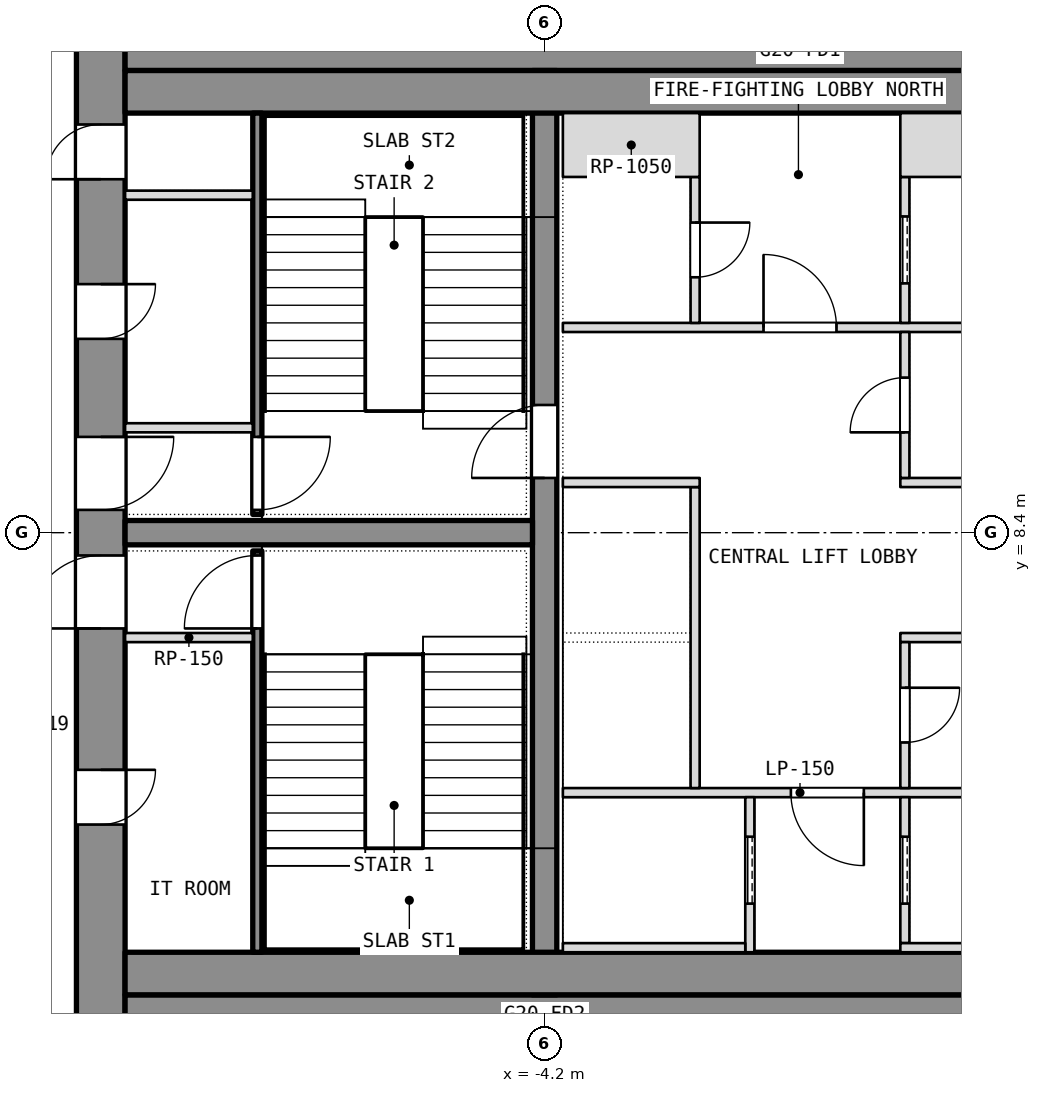
"""IFC4 building model, lengths in metres.
Left out: names, types, materials, properties, quantities, classifications, styles, units other than length and angle.
Written with IfcOpenShell. Run it as: python <this file> out.ifc"""

import sys

from ifc_helpers import new_model, si_unit, direction, frame, frame_2d, origin, place, context, subcontext, project, spatial, rectangle, extrude, element, fill, save


model = new_model("IFC4")
c1 = context("Model", 3, precision=1e-05, world=origin(), true_north=direction((0.0, 1.0)))
c2 = subcontext(c1, "Body", "Model", "MODEL_VIEW")
j1 = project(units=[si_unit("LENGTHUNIT", "METRE"), si_unit("PLANEANGLEUNIT", "RADIAN")], contexts=[c1])
p1 = place(None, origin())
s1 = spatial("IfcSite", under=j1, at=p1, CompositionType="ELEMENT")
p2 = place(p1, origin())
s2 = spatial("IfcBuilding", under=s1, at=p2, CompositionType="ELEMENT")
p3 = place(p2, frame((0.0, 0.0, 234.5)))
s3 = spatial("IfcBuildingStorey", under=s2, at=p3, CompositionType="ELEMENT", Elevation=234.5)
p4 = place(p3, frame((-11.5, 0.0, 0.0), z_axis=(0.0, 0.0, 1.0), x_axis=(0.0, 1.0, 0.0)))
e1 = element("IfcWall", 1, at=p4, inside=s3, PredefinedType="SHEAR", context=c2, shape_type="SweptSolid", body=[
    extrude(rectangle(XDim=16.8, YDim=0.8, at=frame_2d((8.4, 0.0))), origin(), (0.0, 0.0, 1.0), 3.6),
])
p5 = place(p4, frame((3.6, 0.0, 0.0)))
e2 = element("IfcOpeningElement", 2, at=p5, cuts=e1, PredefinedType="OPENING", context=c2, shape_type="SweptSolid", body=[
    extrude(rectangle(XDim=0.9, YDim=2.1, at=frame_2d((0.45, 1.05))), frame((0.0, 0.4, 0.0), z_axis=(0.0, -1.0, 0.0), x_axis=(1.0, 0.0, 0.0)), (0.0, 0.0, 1.0), 0.8),
])
p6 = place(p4, frame((6.825, 0.0, 0.0)))
e3 = element("IfcOpeningElement", 3, at=p6, cuts=e1, PredefinedType="OPENING", context=c2, shape_type="SweptSolid", body=[
    extrude(rectangle(XDim=1.2, YDim=2.1, at=frame_2d((0.6, 1.05))), frame((0.0, 0.4, 0.0), z_axis=(0.0, -1.0, 0.0), x_axis=(1.0, 0.0, 0.0)), (0.0, 0.0, 1.0), 0.8),
])
p7 = place(p4, frame((14.212, 0.0, 0.0)))
e4 = element("IfcOpeningElement", 4, at=p7, cuts=e1, PredefinedType="OPENING", context=c2, shape_type="SweptSolid", body=[
    extrude(rectangle(XDim=0.9, YDim=2.1, at=frame_2d((0.45, 1.05))), frame((0.0, 0.4, 0.0), z_axis=(0.0, -1.0, 0.0), x_axis=(1.0, 0.0, 0.0)), (0.0, 0.0, 1.0), 0.8),
])
p8 = place(p4, frame((11.587, 0.0, 0.0)))
e5 = element("IfcOpeningElement", 5, at=p8, cuts=e1, PredefinedType="OPENING", context=c2, shape_type="SweptSolid", body=[
    extrude(rectangle(XDim=0.9, YDim=2.1, at=frame_2d((0.45, 1.05))), frame((0.0, 0.4, 0.0), z_axis=(0.0, -1.0, 0.0), x_axis=(1.0, 0.0, 0.0)), (0.0, 0.0, 1.0), 0.8),
])
p9 = place(p4, frame((8.775, 0.0, 0.0)))
e6 = element("IfcOpeningElement", 6, at=p9, cuts=e1, PredefinedType="OPENING", context=c2, shape_type="SweptSolid", body=[
    extrude(rectangle(XDim=1.2, YDim=2.1, at=frame_2d((0.6, 1.05))), frame((0.0, 0.4, 0.0), z_axis=(0.0, -1.0, 0.0), x_axis=(1.0, 0.0, 0.0)), (0.0, 0.0, 1.0), 0.8),
])
for number, where, z_axis, x_axis in (
    (7, (-11.1, 0.4, 0.0), (0.0, 0.0, 1.0), (1.0, 0.0, 0.0)),
    (8, (-11.1, 16.4, 0.0), (0.0, 0.0, 1.0), (1.0, 0.0, 0.0)),
):
    element("IfcWall", number, at=place(p3, frame(where, z_axis=z_axis, x_axis=x_axis)), inside=s3, PredefinedType="SHEAR", context=c2, shape_type="SweptSolid", body=[
        extrude(rectangle(XDim=22.2, YDim=0.8, at=frame_2d((11.1, 0.0))), origin(), (0.0, 0.0, 1.0), 3.6),
    ])
p10 = place(p3, frame((-4.2, 0.8, 0.0), z_axis=(0.0, 0.0, 1.0), x_axis=(0.0, 1.0, 0.0)))
e9 = element("IfcWall", 9, at=p10, inside=s3, PredefinedType="SHEAR", context=c2, shape_type="SweptSolid", body=[
    extrude(rectangle(XDim=15.2, YDim=0.4, at=frame_2d((7.6, 0.0))), origin(), (0.0, 0.0, 1.0), 3.6),
])
p11 = place(p10, frame((8.5, 0.0, 0.0)))
e10 = element("IfcOpeningElement", 10, at=p11, cuts=e9, PredefinedType="OPENING", context=c2, shape_type="SweptSolid", body=[
    extrude(rectangle(XDim=1.2, YDim=2.1, at=frame_2d((0.6, 1.05))), frame((0.0, 0.2, 0.0), z_axis=(0.0, -1.0, 0.0), x_axis=(1.0, 0.0, 0.0)), (0.0, 0.0, 1.0), 0.4),
])
p12 = place(p3, frame((-11.1, 8.4, 0.0), z_axis=(0.0, 0.0, 1.0), x_axis=(1.0, 0.0, 0.0)))
e11 = element("IfcWall", 11, at=p12, inside=s3, PredefinedType="SHEAR", context=c2, shape_type="SweptSolid", body=[
    extrude(rectangle(XDim=6.7, YDim=0.4, at=frame_2d((3.35, 0.0))), origin(), (0.0, 0.0, 1.0), 3.6),
])
for number, where, z_axis, x_axis in (
    (12, (-11.1, 1.15, 0.0), (0.0, 0.0, 1.0), (1.0, 0.0, 0.0)),
    (13, (-11.1, 15.65, 0.0), (0.0, 0.0, 1.0), (1.0, 0.0, 0.0)),
):
    element("IfcWall", number, at=place(p3, frame(where, z_axis=z_axis, x_axis=x_axis)), inside=s3, PredefinedType="PARTITIONING", context=c2, shape_type="SweptSolid", body=[
        extrude(rectangle(XDim=22.2, YDim=0.7, at=frame_2d((11.1, 0.0))), origin(), (0.0, 0.0, 1.0), 3.34),
    ])
p13 = place(p3, frame((-8.925, 1.5, 0.0), z_axis=(0.0, 0.0, 1.0), x_axis=(0.0, 1.0, 0.0)))
e14 = element("IfcWall", 14, at=p13, inside=s3, PredefinedType="SHEAR", context=c2, shape_type="SweptSolid", body=[
    extrude(rectangle(XDim=6.6, YDim=0.15, at=frame_2d((3.3, 0.0))), origin(), (0.0, 0.0, 1.0), 3.34),
])
p14 = place(p13, frame((5.325, 0.0, 0.0)))
e15 = element("IfcOpeningElement", 15, at=p14, cuts=e14, PredefinedType="OPENING", context=c2, shape_type="SweptSolid", body=[
    extrude(rectangle(XDim=1.2, YDim=2.1, at=frame_2d((0.6, 1.05))), frame((0.0, 0.075, 0.0), z_axis=(0.0, -1.0, 0.0), x_axis=(1.0, 0.0, 0.0)), (0.0, 0.0, 1.0), 0.15),
])
p15 = place(p3, frame((-11.1, 6.675, 0.0), z_axis=(0.0, 0.0, 1.0), x_axis=(1.0, 0.0, 0.0)))
e16 = element("IfcWall", 16, at=p15, inside=s3, PredefinedType="PARTITIONING", context=c2, shape_type="SweptSolid", body=[
    extrude(rectangle(XDim=2.1, YDim=0.15, at=frame_2d((1.05, 0.0))), origin(), (0.0, 0.0, 1.0), 3.34),
])
p16 = place(p3, frame((-8.925, 8.7, 0.0), z_axis=(0.0, 0.0, 1.0), x_axis=(0.0, 1.0, 0.0)))
e17 = element("IfcWall", 17, at=p16, inside=s3, PredefinedType="SHEAR", context=c2, shape_type="SweptSolid", body=[
    extrude(rectangle(XDim=6.6, YDim=0.15, at=frame_2d((3.3, 0.0))), origin(), (0.0, 0.0, 1.0), 3.34),
])
p17 = place(p16, frame((0.075, 0.0, 0.0)))
e18 = element("IfcOpeningElement", 18, at=p17, cuts=e17, PredefinedType="OPENING", context=c2, shape_type="SweptSolid", body=[
    extrude(rectangle(XDim=1.2, YDim=2.1, at=frame_2d((0.6, 1.05))), frame((0.0, 0.075, 0.0), z_axis=(0.0, -1.0, 0.0), x_axis=(1.0, 0.0, 0.0)), (0.0, 0.0, 1.0), 0.15),
])
for number, where, z_axis, x_axis in (
    (19, (-11.1, 10.125, 0.0), (0.0, 0.0, 1.0), (1.0, 0.0, 0.0)),
    (20, (-11.1, 13.95, 0.0), (0.0, 0.0, 1.0), (1.0, 0.0, 0.0)),
):
    element("IfcWall", number, at=place(p3, frame(where, z_axis=z_axis, x_axis=x_axis)), inside=s3, PredefinedType="PARTITIONING", context=c2, shape_type="SweptSolid", body=[
        extrude(rectangle(XDim=2.1, YDim=0.15, at=frame_2d((1.05, 0.0))), origin(), (0.0, 0.0, 1.0), 3.34),
    ])
p18 = place(p3, frame((-3.9, 4.125, 0.0), z_axis=(0.0, 0.0, 1.0), x_axis=(1.0, 0.0, 0.0)))
e21 = element("IfcWall", 21, at=p18, inside=s3, PredefinedType="PARTITIONING", context=c2, shape_type="SweptSolid", body=[
    extrude(rectangle(XDim=7.8, YDim=0.15, at=frame_2d((3.9, 0.0))), origin(), (0.0, 0.0, 1.0), 3.34),
])
p19 = place(p18, frame((3.75, 0.0, 0.0)))
e22 = element("IfcOpeningElement", 22, at=p19, cuts=e21, PredefinedType="OPENING", context=c2, shape_type="SweptSolid", body=[
    extrude(rectangle(XDim=1.2, YDim=2.1, at=frame_2d((0.6, 1.05))), frame((0.0, 0.075, 0.0), z_axis=(0.0, -1.0, 0.0), x_axis=(1.0, 0.0, 0.0)), (0.0, 0.0, 1.0), 0.15),
])
p20 = place(p3, frame((-3.9, 11.775, 0.0), z_axis=(0.0, 0.0, 1.0), x_axis=(1.0, 0.0, 0.0)))
e23 = element("IfcWall", 23, at=p20, inside=s3, PredefinedType="PARTITIONING", context=c2, shape_type="SweptSolid", body=[
    extrude(rectangle(XDim=7.8, YDim=0.15, at=frame_2d((3.9, 0.0))), origin(), (0.0, 0.0, 1.0), 3.34),
])
p21 = place(p20, frame((3.3, 0.0, 0.0)))
e24 = element("IfcOpeningElement", 24, at=p21, cuts=e23, PredefinedType="OPENING", context=c2, shape_type="SweptSolid", body=[
    extrude(rectangle(XDim=1.2, YDim=2.1, at=frame_2d((0.6, 1.05))), frame((0.0, 0.075, 0.0), z_axis=(0.0, -1.0, 0.0), x_axis=(1.0, 0.0, 0.0)), (0.0, 0.0, 1.0), 0.15),
])
p22 = place(p3, frame((-0.825, 1.5, 0.0), z_axis=(0.0, 0.0, 1.0), x_axis=(0.0, 1.0, 0.0)))
e25 = element("IfcWall", 25, at=p22, inside=s3, PredefinedType="SHEAR", context=c2, shape_type="SweptSolid", body=[
    extrude(rectangle(XDim=2.55, YDim=0.15, at=frame_2d((1.275, 0.0))), origin(), (0.0, 0.0, 1.0), 3.6),
])
p23 = place(p22, frame((0.8, 0.0, 0.0)))
e26 = element("IfcOpeningElement", 26, at=p23, cuts=e25, PredefinedType="OPENING", context=c2, shape_type="SweptSolid", body=[
    extrude(rectangle(XDim=1.1, YDim=2.1, at=frame_2d((0.55, 1.05))), frame((0.0, 0.075, 0.0), z_axis=(0.0, -1.0, 0.0), x_axis=(1.0, 0.0, 0.0)), (0.0, 0.0, 1.0), 0.15),
])
p24 = place(p3, frame((-3.9, 1.575, 0.0), z_axis=(0.0, 0.0, 1.0), x_axis=(1.0, 0.0, 0.0)))
e27 = element("IfcWall", 27, at=p24, inside=s3, PredefinedType="SHEAR", context=c2, shape_type="SweptSolid", body=[
    extrude(rectangle(XDim=3.0, YDim=0.15, at=frame_2d((1.5, 0.0))), origin(), (0.0, 0.0, 1.0), 3.6),
])
p25 = place(p3, frame((-1.725, 4.2, 0.0), z_axis=(0.0, 0.0, 1.0), x_axis=(0.0, 1.0, 0.0)))
e28 = element("IfcWall", 28, at=p25, inside=s3, PredefinedType="SHEAR", context=c2, shape_type="SweptSolid", body=[
    extrude(rectangle(XDim=4.95, YDim=0.15, at=frame_2d((2.475, 0.0))), origin(), (0.0, 0.0, 1.0), 3.6),
])
p26 = place(p3, frame((-3.9, 9.225, 0.0), z_axis=(0.0, 0.0, 1.0), x_axis=(1.0, 0.0, 0.0)))
e29 = element("IfcWall", 29, at=p26, inside=s3, PredefinedType="SHEAR", context=c2, shape_type="SweptSolid", body=[
    extrude(rectangle(XDim=2.25, YDim=0.15, at=frame_2d((1.125, 0.0))), origin(), (0.0, 0.0, 1.0), 3.6),
])
p27 = place(p3, frame((-1.725, 11.85, 0.0), z_axis=(0.0, 0.0, 1.0), x_axis=(0.0, 1.0, 0.0)))
e30 = element("IfcWall", 30, at=p27, inside=s3, PredefinedType="PARTITIONING", context=c2, shape_type="SweptSolid", body=[
    extrude(rectangle(XDim=2.4, YDim=0.15, at=frame_2d((1.2, 0.0))), origin(), (0.0, 0.0, 1.0), 3.34),
])
p28 = place(p27, frame((0.75, 0.0, 0.0)))
e31 = element("IfcOpeningElement", 31, at=p28, cuts=e30, PredefinedType="OPENING", context=c2, shape_type="SweptSolid", body=[
    extrude(rectangle(XDim=0.9, YDim=2.1, at=frame_2d((0.45, 1.05))), frame((0.0, 0.075, 0.0), z_axis=(0.0, -1.0, 0.0), x_axis=(1.0, 0.0, 0.0)), (0.0, 0.0, 1.0), 0.15),
])
p29 = place(p3, frame((-3.9, 14.775, 0.0), z_axis=(0.0, 0.0, 1.0), x_axis=(1.0, 0.0, 0.0)))
e32 = element("IfcWall", 32, at=p29, inside=s3, PredefinedType="PARTITIONING", context=c2, shape_type="SweptSolid", body=[
    extrude(rectangle(XDim=2.25, YDim=1.05, at=frame_2d((1.125, 0.0))), origin(), (0.0, 0.0, 1.0), 3.34),
])
p30 = place(p3, frame((1.725, 1.65, 0.0), z_axis=(0.0, 0.0, 1.0), x_axis=(0.0, 1.0, 0.0)))
e33 = element("IfcWall", 33, at=p30, inside=s3, PredefinedType="SHEAR", context=c2, shape_type="SweptSolid", body=[
    extrude(rectangle(XDim=2.4, YDim=0.15, at=frame_2d((1.2, 0.0))), origin(), (0.0, 0.0, 1.0), 3.6),
])
p31 = place(p30, frame((0.65, 0.0, 0.0)))
e34 = element("IfcOpeningElement", 34, at=p31, cuts=e33, PredefinedType="OPENING", context=c2, shape_type="SweptSolid", body=[
    extrude(rectangle(XDim=1.1, YDim=2.1, at=frame_2d((0.55, 1.05))), frame((0.0, 0.075, 0.0), z_axis=(0.0, -1.0, 0.0), x_axis=(1.0, 0.0, 0.0)), (0.0, 0.0, 1.0), 0.15),
])
p32 = place(p3, frame((1.65, 1.575, 0.0), z_axis=(0.0, 0.0, 1.0), x_axis=(1.0, 0.0, 0.0)))
e35 = element("IfcWall", 35, at=p32, inside=s3, PredefinedType="SHEAR", context=c2, shape_type="SweptSolid", body=[
    extrude(rectangle(XDim=2.25, YDim=0.15, at=frame_2d((1.125, 0.0))), origin(), (0.0, 0.0, 1.0), 3.6),
])
p33 = place(p3, frame((1.725, 11.85, 0.0), z_axis=(0.0, 0.0, 1.0), x_axis=(0.0, 1.0, 0.0)))
e36 = element("IfcWall", 36, at=p33, inside=s3, PredefinedType="SHEAR", context=c2, shape_type="SweptSolid", body=[
    extrude(rectangle(XDim=2.4, YDim=0.15, at=frame_2d((1.2, 0.0))), origin(), (0.0, 0.0, 1.0), 3.6),
])
p34 = place(p33, frame((0.65, 0.0, 0.0)))
e37 = element("IfcOpeningElement", 37, at=p34, cuts=e36, PredefinedType="OPENING", context=c2, shape_type="SweptSolid", body=[
    extrude(rectangle(XDim=1.1, YDim=2.1, at=frame_2d((0.55, 1.05))), frame((0.0, 0.075, 0.0), z_axis=(0.0, -1.0, 0.0), x_axis=(1.0, 0.0, 0.0)), (0.0, 0.0, 1.0), 0.15),
])
p35 = place(p3, frame((1.65, 14.775, 0.0), z_axis=(0.0, 0.0, 1.0), x_axis=(1.0, 0.0, 0.0)))
e38 = element("IfcWall", 38, at=p35, inside=s3, PredefinedType="SHEAR", context=c2, shape_type="SweptSolid", body=[
    extrude(rectangle(XDim=2.25, YDim=1.05, at=frame_2d((1.125, 0.0))), origin(), (0.0, 0.0, 1.0), 3.6),
])
for number, where, z_axis, x_axis in (
    (39, (1.65, 6.675, 0.0), (0.0, 0.0, 1.0), (1.0, 0.0, 0.0)),
    (40, (1.65, 9.225, 0.0), (0.0, 0.0, 1.0), (1.0, 0.0, 0.0)),
):
    element("IfcWall", number, at=place(p3, frame(where, z_axis=z_axis, x_axis=x_axis)), inside=s3, PredefinedType="PARTITIONING", context=c2, shape_type="SweptSolid", body=[
        extrude(rectangle(XDim=2.25, YDim=0.15, at=frame_2d((1.125, 0.0))), origin(), (0.0, 0.0, 1.0), 3.34),
    ])
p36 = place(p3, frame((1.725, 4.2, 0.0), z_axis=(0.0, 0.0, 1.0), x_axis=(0.0, 1.0, 0.0)))
e41 = element("IfcWall", 41, at=p36, inside=s3, PredefinedType="PARTITIONING", context=c2, shape_type="SweptSolid", body=[
    extrude(rectangle(XDim=2.4, YDim=0.15, at=frame_2d((1.2, 0.0))), origin(), (0.0, 0.0, 1.0), 3.34),
])
p37 = place(p36, frame((0.75, 0.0, 0.0)))
e42 = element("IfcOpeningElement", 42, at=p37, cuts=e41, PredefinedType="OPENING", context=c2, shape_type="SweptSolid", body=[
    extrude(rectangle(XDim=0.9, YDim=2.1, at=frame_2d((0.45, 1.05))), frame((0.0, 0.075, 0.0), z_axis=(0.0, -1.0, 0.0), x_axis=(1.0, 0.0, 0.0)), (0.0, 0.0, 1.0), 0.15),
])
p38 = place(p3, frame((1.725, 9.3, 0.0), z_axis=(0.0, 0.0, 1.0), x_axis=(0.0, 1.0, 0.0)))
e43 = element("IfcWall", 43, at=p38, inside=s3, PredefinedType="PARTITIONING", context=c2, shape_type="SweptSolid", body=[
    extrude(rectangle(XDim=2.4, YDim=0.15, at=frame_2d((1.2, 0.0))), origin(), (0.0, 0.0, 1.0), 3.34),
])
p39 = place(p38, frame((0.75, 0.0, 0.0)))
e44 = element("IfcOpeningElement", 44, at=p39, cuts=e43, PredefinedType="OPENING", context=c2, shape_type="SweptSolid", body=[
    extrude(rectangle(XDim=0.9, YDim=2.1, at=frame_2d((0.45, 1.05))), frame((0.0, 0.075, 0.0), z_axis=(0.0, -1.0, 0.0), x_axis=(1.0, 0.0, 0.0)), (0.0, 0.0, 1.0), 0.15),
])
p40 = place(p5, origin())
e45 = element("IfcDoor", 45, at=p40, inside=s3, OperationType="SINGLE_SWING_LEFT", PredefinedType="DOOR", context=c2, shape_type="SweptSolid", body=[
    extrude(rectangle(XDim=0.9, YDim=2.1, at=frame_2d((0.45, 1.05))), frame((0.0, 0.025, 0.0), z_axis=(0.0, -1.0, 0.0), x_axis=(1.0, 0.0, 0.0)), (0.0, 0.0, 1.0), 0.05),
])
fill(e2, e45)
p41 = place(p6, origin())
e46 = element("IfcDoor", 46, at=p41, inside=s3, OperationType="SINGLE_SWING_LEFT", PredefinedType="DOOR", context=c2, shape_type="SweptSolid", body=[
    extrude(rectangle(XDim=1.2, YDim=2.1, at=frame_2d((0.6, 1.05))), frame((0.0, 0.025, 0.0), z_axis=(0.0, -1.0, 0.0), x_axis=(1.0, 0.0, 0.0)), (0.0, 0.0, 1.0), 0.05),
])
fill(e3, e46)
p42 = place(p14, origin())
e47 = element("IfcDoor", 47, at=p42, inside=s3, OperationType="SINGLE_SWING_LEFT", PredefinedType="DOOR", context=c2, shape_type="SweptSolid", body=[
    extrude(rectangle(XDim=1.2, YDim=2.1, at=frame_2d((0.6, 1.05))), frame((0.0, 0.025, 0.0), z_axis=(0.0, -1.0, 0.0), x_axis=(1.0, 0.0, 0.0)), (0.0, 0.0, 1.0), 0.05),
])
fill(e15, e47)
p43 = place(p7, origin())
e48 = element("IfcDoor", 48, at=p43, inside=s3, OperationType="SINGLE_SWING_LEFT", PredefinedType="DOOR", context=c2, shape_type="SweptSolid", body=[
    extrude(rectangle(XDim=0.9, YDim=2.1, at=frame_2d((0.45, 1.05))), frame((0.0, 0.025, 0.0), z_axis=(0.0, -1.0, 0.0), x_axis=(1.0, 0.0, 0.0)), (0.0, 0.0, 1.0), 0.05),
])
fill(e4, e48)
p44 = place(p8, origin())
e49 = element("IfcDoor", 49, at=p44, inside=s3, OperationType="SINGLE_SWING_LEFT", PredefinedType="DOOR", context=c2, shape_type="SweptSolid", body=[
    extrude(rectangle(XDim=0.9, YDim=2.1, at=frame_2d((0.45, 1.05))), frame((0.0, 0.025, 0.0), z_axis=(0.0, -1.0, 0.0), x_axis=(1.0, 0.0, 0.0)), (0.0, 0.0, 1.0), 0.05),
])
fill(e5, e49)
p45 = place(p9, origin())
e50 = element("IfcDoor", 50, at=p45, inside=s3, OperationType="SINGLE_SWING_LEFT", PredefinedType="DOOR", context=c2, shape_type="SweptSolid", body=[
    extrude(rectangle(XDim=1.2, YDim=2.1, at=frame_2d((0.6, 1.05))), frame((0.0, 0.025, 0.0), z_axis=(0.0, -1.0, 0.0), x_axis=(1.0, 0.0, 0.0)), (0.0, 0.0, 1.0), 0.05),
])
fill(e6, e50)
p46 = place(p17, origin())
e51 = element("IfcDoor", 51, at=p46, inside=s3, OperationType="SINGLE_SWING_LEFT", PredefinedType="DOOR", context=c2, shape_type="SweptSolid", body=[
    extrude(rectangle(XDim=1.2, YDim=2.1, at=frame_2d((0.6, 1.05))), frame((0.0, 0.025, 0.0), z_axis=(0.0, -1.0, 0.0), x_axis=(1.0, 0.0, 0.0)), (0.0, 0.0, 1.0), 0.05),
])
fill(e18, e51)
p47 = place(p37, origin())
e52 = element("IfcDoor", 52, at=p47, inside=s3, OperationType="SINGLE_SWING_LEFT", PredefinedType="DOOR", context=c2, shape_type="SweptSolid", body=[
    extrude(rectangle(XDim=0.9, YDim=2.1, at=frame_2d((0.45, 1.05))), frame((0.0, 0.025, 0.0), z_axis=(0.0, -1.0, 0.0), x_axis=(1.0, 0.0, 0.0)), (0.0, 0.0, 1.0), 0.05),
])
fill(e42, e52)
p48 = place(p39, origin())
e53 = element("IfcDoor", 53, at=p48, inside=s3, OperationType="SINGLE_SWING_LEFT", PredefinedType="DOOR", context=c2, shape_type="SweptSolid", body=[
    extrude(rectangle(XDim=0.9, YDim=2.1, at=frame_2d((0.45, 1.05))), frame((0.0, 0.025, 0.0), z_axis=(0.0, -1.0, 0.0), x_axis=(1.0, 0.0, 0.0)), (0.0, 0.0, 1.0), 0.05),
])
fill(e44, e53)
p49 = place(p23, origin())
e54 = element("IfcDoor", 54, at=p49, inside=s3, OperationType="SLIDING_TO_LEFT", PredefinedType="DOOR", context=c2, shape_type="SweptSolid", body=[
    extrude(rectangle(XDim=1.1, YDim=2.1, at=frame_2d((0.55, 1.05))), frame((0.0, 0.025, 0.0), z_axis=(0.0, -1.0, 0.0), x_axis=(1.0, 0.0, 0.0)), (0.0, 0.0, 1.0), 0.05),
])
fill(e26, e54)
p50 = place(p31, origin())
e55 = element("IfcDoor", 55, at=p50, inside=s3, OperationType="SLIDING_TO_LEFT", PredefinedType="DOOR", context=c2, shape_type="SweptSolid", body=[
    extrude(rectangle(XDim=1.1, YDim=2.1, at=frame_2d((0.55, 1.05))), frame((0.0, 0.025, 0.0), z_axis=(0.0, -1.0, 0.0), x_axis=(1.0, 0.0, 0.0)), (0.0, 0.0, 1.0), 0.05),
])
fill(e34, e55)
p51 = place(p34, origin())
e56 = element("IfcDoor", 56, at=p51, inside=s3, OperationType="SLIDING_TO_LEFT", PredefinedType="DOOR", context=c2, shape_type="SweptSolid", body=[
    extrude(rectangle(XDim=1.1, YDim=2.1, at=frame_2d((0.55, 1.05))), frame((0.0, 0.025, 0.0), z_axis=(0.0, -1.0, 0.0), x_axis=(1.0, 0.0, 0.0)), (0.0, 0.0, 1.0), 0.05),
])
fill(e37, e56)
p52 = place(p19, origin())
e57 = element("IfcDoor", 57, at=p52, inside=s3, OperationType="SINGLE_SWING_LEFT", PredefinedType="DOOR", context=c2, shape_type="SweptSolid", body=[
    extrude(rectangle(XDim=1.2, YDim=2.1, at=frame_2d((0.6, 1.05))), frame((0.0, 0.025, 0.0), z_axis=(0.0, -1.0, 0.0), x_axis=(1.0, 0.0, 0.0)), (0.0, 0.0, 1.0), 0.05),
])
fill(e22, e57)
p53 = place(p21, origin())
e58 = element("IfcDoor", 58, at=p53, inside=s3, OperationType="SINGLE_SWING_LEFT", PredefinedType="DOOR", context=c2, shape_type="SweptSolid", body=[
    extrude(rectangle(XDim=1.2, YDim=2.1, at=frame_2d((0.6, 1.05))), frame((0.0, 0.025, 0.0), z_axis=(0.0, -1.0, 0.0), x_axis=(1.0, 0.0, 0.0)), (0.0, 0.0, 1.0), 0.05),
])
fill(e24, e58)
p54 = place(p28, origin())
e59 = element("IfcDoor", 59, at=p54, inside=s3, OperationType="SINGLE_SWING_LEFT", PredefinedType="DOOR", context=c2, shape_type="SweptSolid", body=[
    extrude(rectangle(XDim=0.9, YDim=2.1, at=frame_2d((0.45, 1.05))), frame((0.0, 0.025, 0.0), z_axis=(0.0, -1.0, 0.0), x_axis=(1.0, 0.0, 0.0)), (0.0, 0.0, 1.0), 0.05),
])
fill(e31, e59)
p55 = place(p11, origin())
e60 = element("IfcDoor", 60, at=p55, inside=s3, OperationType="SINGLE_SWING_LEFT", PredefinedType="DOOR", context=c2, shape_type="SweptSolid", body=[
    extrude(rectangle(XDim=1.2, YDim=2.1, at=frame_2d((0.6, 1.05))), frame((0.0, 0.025, 0.0), z_axis=(0.0, -1.0, 0.0), x_axis=(1.0, 0.0, 0.0)), (0.0, 0.0, 1.0), 0.05),
])
fill(e10, e60)
save(model, sys.argv[1])
